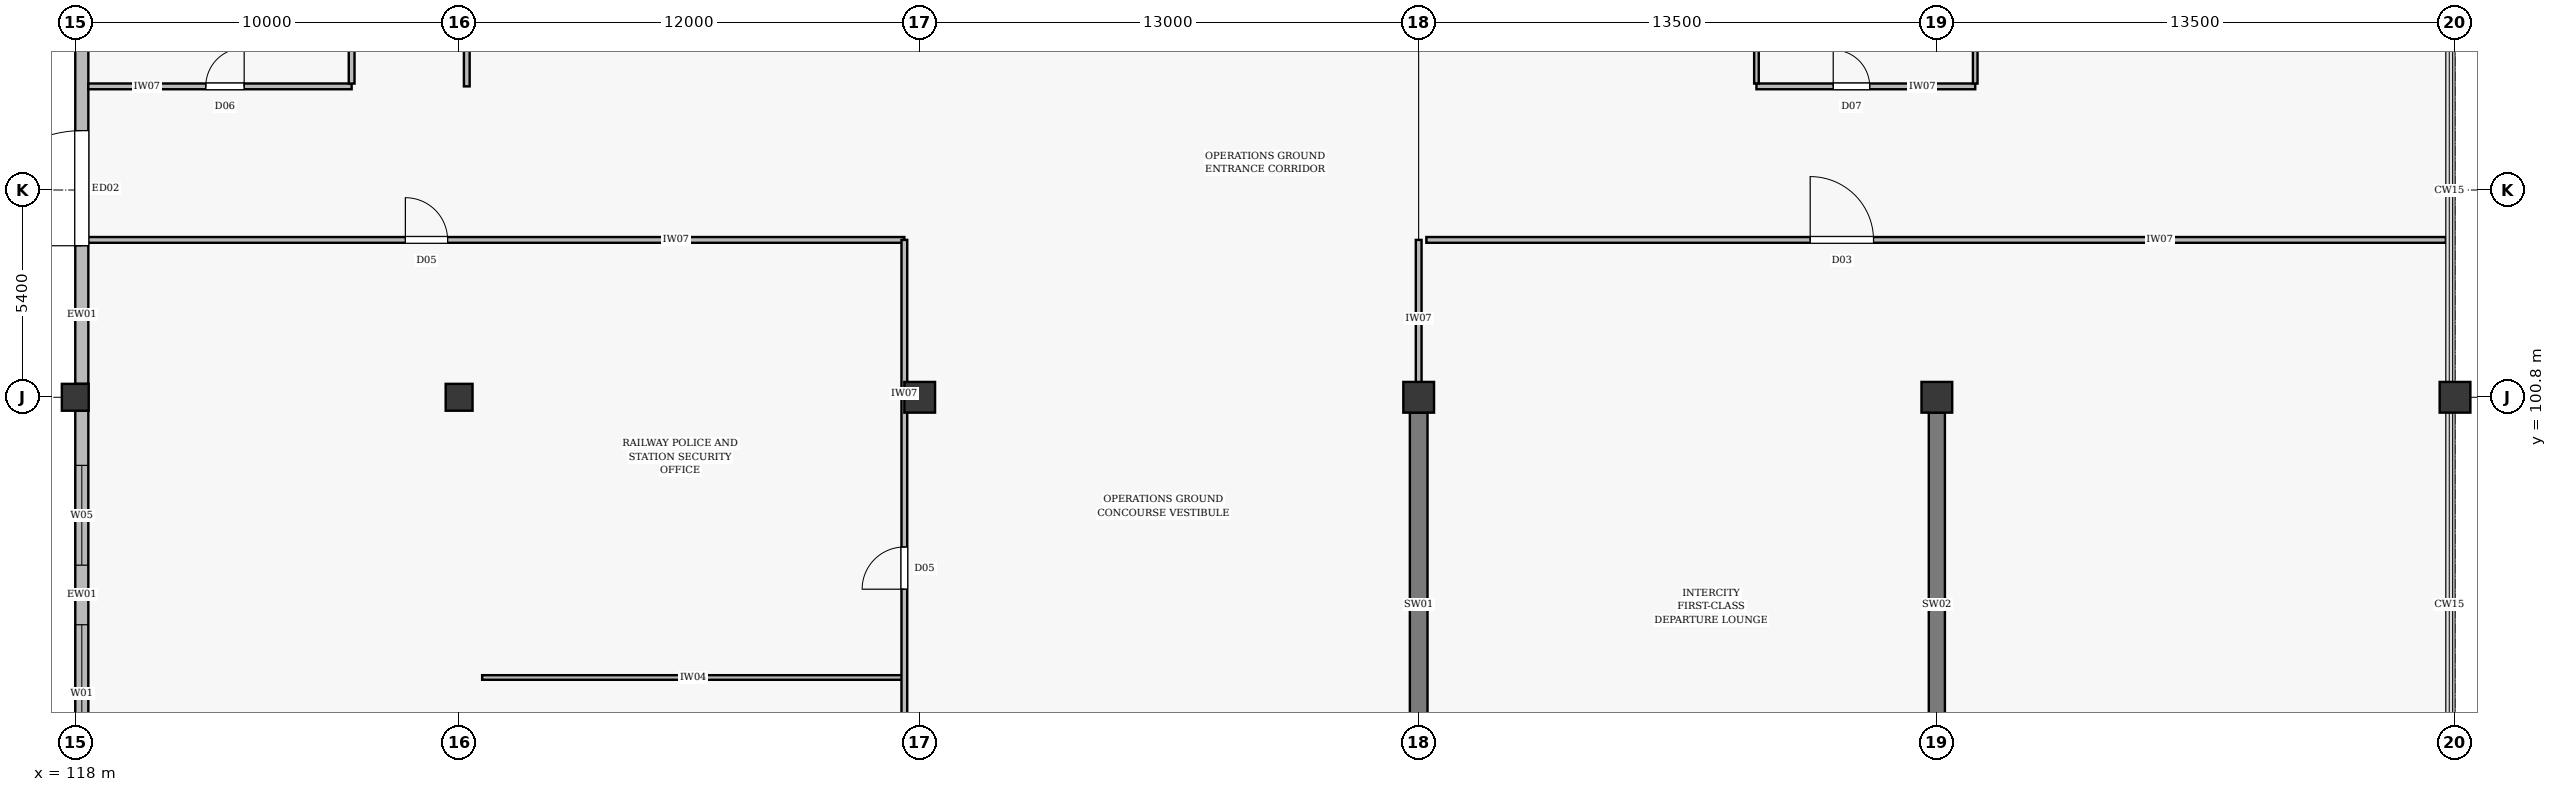
"""IFC4 building model, lengths in metres.
Left out: names, types, materials, properties, quantities, classifications, styles, units other than length and angle.
Written with IfcOpenShell. Run it as: python <this file> out.ifc"""

import sys

from ifc_helpers import new_model, si_unit, direction, frame, frame_2d, origin, origin_2d, place, context, subcontext, project, spatial, rectangle, extrude, element, fill, save


model = new_model("IFC4")
c1 = context("Model", 3, precision=1e-05, world=origin(), true_north=direction((0.0, 1.0)))
c2 = subcontext(c1, "Body", "Model", "MODEL_VIEW")
j1 = project(units=[si_unit("LENGTHUNIT", "METRE"), si_unit("PLANEANGLEUNIT", "RADIAN")], contexts=[c1])
p1 = place(None, origin())
s1 = spatial("IfcSite", under=j1, at=p1, CompositionType="ELEMENT")
p2 = place(p1, origin())
s2 = spatial("IfcBuilding", under=s1, at=p2, CompositionType="ELEMENT")
p3 = place(p2, origin())
s3 = spatial("IfcBuildingStorey", under=s2, at=p3, CompositionType="ELEMENT", Elevation=0.0)
for number, where, z_axis, x_axis in (
    (1, (118.0, 100.8, 0.0), (0.0, 0.0, 1.0), (1.0, 0.0, 0.0)),
    (2, (128.0, 100.8, 0.0), (0.0, 0.0, 1.0), (1.0, 0.0, 0.0)),
):
    element("IfcColumn", number, at=place(p3, frame(where, z_axis=z_axis, x_axis=x_axis)), inside=s3, PredefinedType="COLUMN", context=c2, shape_type="SweptSolid", body=[
        extrude(rectangle(XDim=0.7, YDim=0.7, at=origin_2d()), origin(), (0.0, 0.0, 1.0), 6.6),
    ])
for number, where, z_axis, x_axis in (
    (3, (140.0, 100.8, 0.0), (0.0, 0.0, 1.0), (1.0, 0.0, 0.0)),
    (4, (153.0, 100.8, 0.0), (0.0, 0.0, 1.0), (1.0, 0.0, 0.0)),
    (5, (166.5, 100.8, 0.0), (0.0, 0.0, 1.0), (1.0, 0.0, 0.0)),
    (6, (180.0, 100.8, 0.0), (0.0, 0.0, 1.0), (1.0, 0.0, 0.0)),
):
    element("IfcColumn", number, at=place(p3, frame(where, z_axis=z_axis, x_axis=x_axis)), inside=s3, PredefinedType="COLUMN", context=c2, shape_type="SweptSolid", body=[
        extrude(rectangle(XDim=0.8, YDim=0.8, at=origin_2d()), origin(), (0.0, 0.0, 1.0), 6.6),
    ])
p4 = place(p3, frame((153.0, 90.398, 0.0), z_axis=(0.0, 0.0, 1.0), x_axis=(0.0, 1.0, 0.0)))
e7 = element("IfcWall", 7, at=p4, inside=s3, PredefinedType="SHEAR", context=c2, shape_type="SweptSolid", body=[
    extrude(rectangle(XDim=10.004, YDim=0.46, at=frame_2d((5.002, 0.0))), origin(), (0.0, 0.0, 1.0), 6.35),
])
p5 = place(p3, frame((166.5, 90.398, 0.0), z_axis=(0.0, 0.0, 1.0), x_axis=(0.0, 1.0, 0.0)))
e8 = element("IfcWall", 8, at=p5, inside=s3, PredefinedType="SHEAR", context=c2, shape_type="SweptSolid", body=[
    extrude(rectangle(XDim=10.004, YDim=0.42, at=frame_2d((5.002, 0.0))), origin(), (0.0, 0.0, 1.0), 6.35),
])
p6 = place(p3, frame((118.17, 90.348, 0.0), z_axis=(0.0, 0.0, 1.0), x_axis=(0.0, 1.0, 0.0)))
e9 = element("IfcWall", 9, at=p6, inside=s3, PredefinedType="STANDARD", context=c2, shape_type="SweptSolid", body=[
    extrude(rectangle(XDim=10.104, YDim=0.34, at=frame_2d((5.052, 0.0))), origin(), (0.0, 0.0, 1.0), 5.75),
])
p7 = place(p6, frame((0.926, 0.0, 0.75)))
e10 = element("IfcOpeningElement", 10, at=p7, cuts=e9, PredefinedType="OPENING", context=c2, shape_type="SweptSolid", body=[
    extrude(rectangle(XDim=3.6, YDim=2.8, at=frame_2d((1.8, 1.4))), frame((0.0, 0.182, 0.0), z_axis=(0.0, -1.0, 0.0), x_axis=(1.0, 0.0, 0.0)), (0.0, 0.0, 1.0), 0.364),
])
p8 = place(p6, frame((6.078, 0.0, 0.75)))
e11 = element("IfcOpeningElement", 11, at=p8, cuts=e9, PredefinedType="OPENING", context=c2, shape_type="SweptSolid", body=[
    extrude(rectangle(XDim=2.6, YDim=2.4, at=frame_2d((1.3, 1.2))), frame((0.0, 0.182, 0.0), z_axis=(0.0, -1.0, 0.0), x_axis=(1.0, 0.0, 0.0)), (0.0, 0.0, 1.0), 0.364),
])
p9 = place(p3, frame((118.17, 101.148, 0.0), z_axis=(0.0, 0.0, 1.0), x_axis=(0.0, 1.0, 0.0)))
e12 = element("IfcWall", 12, at=p9, inside=s3, PredefinedType="STANDARD", context=c2, shape_type="SweptSolid", body=[
    extrude(rectangle(XDim=10.104, YDim=0.34, at=frame_2d((5.052, 0.0))), origin(), (0.0, 0.0, 1.0), 5.75),
])
p10 = place(p9, frame((3.6, 0.0, 0.005)))
e13 = element("IfcOpeningElement", 13, at=p10, cuts=e12, PredefinedType="OPENING", context=c2, shape_type="SweptSolid", body=[
    extrude(rectangle(XDim=3.0, YDim=2.8, at=frame_2d((1.5, 1.4))), frame((0.0, 0.182, 0.0), z_axis=(0.0, -1.0, 0.0), x_axis=(1.0, 0.0, 0.0)), (0.0, 0.0, 1.0), 0.364),
])
p11 = place(p3, frame((118.338, 104.9, 0.0), z_axis=(0.0, 0.0, 1.0), x_axis=(1.0, 0.0, 0.0)))
e14 = element("IfcWall", 14, at=p11, inside=s3, PredefinedType="PARTITIONING", context=c2, shape_type="SweptSolid", body=[
    extrude(rectangle(XDim=21.262, YDim=0.15, at=frame_2d((10.631, 0.0))), origin(), (0.0, 0.0, 1.0), 5.89),
])
p12 = place(p11, frame((8.262, 0.0, 0.005)))
e15 = element("IfcOpeningElement", 15, at=p12, cuts=e14, PredefinedType="OPENING", context=c2, shape_type="SweptSolid", body=[
    extrude(rectangle(XDim=1.1, YDim=2.1, at=frame_2d((0.55, 1.05))), frame((0.0, 0.087, 0.0), z_axis=(0.0, -1.0, 0.0), x_axis=(1.0, 0.0, 0.0)), (0.0, 0.0, 1.0), 0.174),
])
p13 = place(p3, frame((153.2, 104.9, 0.0), z_axis=(0.0, 0.0, 1.0), x_axis=(1.0, 0.0, 0.0)))
e16 = element("IfcWall", 16, at=p13, inside=s3, PredefinedType="PARTITIONING", context=c2, shape_type="SweptSolid", body=[
    extrude(rectangle(XDim=26.562, YDim=0.15, at=frame_2d((13.281, 0.0))), origin(), (0.0, 0.0, 1.0), 5.89),
])
p14 = place(p13, frame((10.0, 0.0, 0.005)))
e17 = element("IfcOpeningElement", 17, at=p14, cuts=e16, PredefinedType="OPENING", context=c2, shape_type="SweptSolid", body=[
    extrude(rectangle(XDim=1.65, YDim=2.2, at=frame_2d((0.825, 1.1))), frame((0.0, 0.087, 0.0), z_axis=(0.0, -1.0, 0.0), x_axis=(1.0, 0.0, 0.0)), (0.0, 0.0, 1.0), 0.174),
])
p15 = place(p3, frame((118.338, 108.9, 0.0), z_axis=(0.0, 0.0, 1.0), x_axis=(1.0, 0.0, 0.0)))
e18 = element("IfcWall", 18, at=p15, inside=s3, PredefinedType="PARTITIONING", context=c2, shape_type="SweptSolid", body=[
    extrude(rectangle(XDim=6.862, YDim=0.15, at=frame_2d((3.431, 0.0))), origin(), (0.0, 0.0, 1.0), 5.89),
])
p16 = place(p15, frame((3.062, 0.0, 0.005)))
e19 = element("IfcOpeningElement", 19, at=p16, cuts=e18, PredefinedType="OPENING", context=c2, shape_type="SweptSolid", body=[
    extrude(rectangle(XDim=1.0, YDim=2.1, at=frame_2d((0.5, 1.05))), frame((0.0, 0.087, 0.0), z_axis=(0.0, -1.0, 0.0), x_axis=(1.0, 0.0, 0.0)), (0.0, 0.0, 1.0), 0.174),
])
p17 = place(p3, frame((125.2, 108.973, 0.0), z_axis=(0.0, 0.0, 1.0), x_axis=(0.0, 1.0, 0.0)))
e20 = element("IfcWall", 20, at=p17, inside=s3, PredefinedType="PARTITIONING", context=c2, shape_type="SweptSolid", body=[
    extrude(rectangle(XDim=6.134, YDim=0.15, at=frame_2d((3.067, 0.0))), origin(), (0.0, 0.0, 1.0), 5.84),
])
p18 = place(p3, frame((161.8, 108.9, 0.0), z_axis=(0.0, 0.0, 1.0), x_axis=(1.0, 0.0, 0.0)))
e21 = element("IfcWall", 21, at=p18, inside=s3, PredefinedType="PARTITIONING", context=c2, shape_type="SweptSolid", body=[
    extrude(rectangle(XDim=5.7, YDim=0.15, at=frame_2d((2.85, 0.0))), origin(), (0.0, 0.0, 1.0), 5.89),
])
p19 = place(p18, frame((2.0, 0.0, 0.005)))
e22 = element("IfcOpeningElement", 22, at=p19, cuts=e21, PredefinedType="OPENING", context=c2, shape_type="SweptSolid", body=[
    extrude(rectangle(XDim=0.95, YDim=2.1, at=frame_2d((0.475, 1.05))), frame((0.0, 0.087, 0.0), z_axis=(0.0, -1.0, 0.0), x_axis=(1.0, 0.0, 0.0)), (0.0, 0.0, 1.0), 0.174),
])
p20 = place(p3, frame((167.5, 108.973, 0.0), z_axis=(0.0, 0.0, 1.0), x_axis=(0.0, 1.0, 0.0)))
e23 = element("IfcWall", 23, at=p20, inside=s3, PredefinedType="PARTITIONING", context=c2, shape_type="SweptSolid", body=[
    extrude(rectangle(XDim=6.427, YDim=0.12, at=frame_2d((3.213, 0.0))), origin(), (0.0, 0.0, 1.0), 5.74),
])
p21 = place(p20, frame((5.177, 0.0, 0.005)))
e24 = element("IfcOpeningElement", 24, at=p21, cuts=e23, PredefinedType="OPENING", context=c2, shape_type="SweptSolid", body=[
    extrude(rectangle(XDim=0.9, YDim=2.1, at=frame_2d((0.45, 1.05))), frame((0.0, 0.072, 0.0), z_axis=(0.0, -1.0, 0.0), x_axis=(1.0, 0.0, 0.0)), (0.0, 0.0, 1.0), 0.144),
])
p22 = place(p3, frame((161.8, 108.973, 0.0), z_axis=(0.0, 0.0, 1.0), x_axis=(0.0, 1.0, 0.0)))
e25 = element("IfcWall", 25, at=p22, inside=s3, PredefinedType="PARTITIONING", context=c2, shape_type="SweptSolid", body=[
    extrude(rectangle(XDim=13.189, YDim=0.12, at=frame_2d((6.595, 0.0))), origin(), (0.0, 0.0, 1.0), 5.74),
])
p23 = place(p3, frame((128.2, 108.9, 0.0), z_axis=(0.0, 0.0, 1.0), x_axis=(0.0, 1.0, 0.0)))
e26 = element("IfcWall", 26, at=p23, inside=s3, PredefinedType="PARTITIONING", context=c2, shape_type="SweptSolid", body=[
    extrude(rectangle(XDim=3.3, YDim=0.15, at=frame_2d((1.65, 0.0))), origin(), (0.0, 0.0, 1.0), 5.84),
])
p24 = place(p3, frame((128.6, 93.5, 0.0), z_axis=(0.0, 0.0, 1.0), x_axis=(1.0, 0.0, 0.0)))
e27 = element("IfcWall", 27, at=p24, inside=s3, PredefinedType="PARTITIONING", context=c2, shape_type="SweptSolid", body=[
    extrude(rectangle(XDim=11.0, YDim=0.12, at=frame_2d((5.5, 0.0))), origin(), (0.0, 0.0, 1.0), 5.89),
])
p25 = place(p3, frame((139.6, 90.3, 0.0), z_axis=(0.0, 0.0, 1.0), x_axis=(0.0, 1.0, 0.0)))
e28 = element("IfcWall", 28, at=p25, inside=s3, PredefinedType="PARTITIONING", context=c2, shape_type="SweptSolid", body=[
    extrude(rectangle(XDim=14.6, YDim=0.15, at=frame_2d((7.3, 0.0))), origin(), (0.0, 0.0, 1.0), 5.74),
])
p26 = place(p25, frame((5.5, 0.0, 0.005)))
e29 = element("IfcOpeningElement", 29, at=p26, cuts=e28, PredefinedType="OPENING", context=c2, shape_type="SweptSolid", body=[
    extrude(rectangle(XDim=1.1, YDim=2.1, at=frame_2d((0.55, 1.05))), frame((0.0, 0.087, 0.0), z_axis=(0.0, -1.0, 0.0), x_axis=(1.0, 0.0, 0.0)), (0.0, 0.0, 1.0), 0.174),
])
p27 = place(p3, frame((153.0, 100.8, 0.0), z_axis=(0.0, 0.0, 1.0), x_axis=(0.0, 1.0, 0.0)))
e30 = element("IfcWall", 30, at=p27, inside=s3, PredefinedType="PARTITIONING", context=c2, shape_type="SweptSolid", body=[
    extrude(rectangle(XDim=4.1, YDim=0.15, at=frame_2d((2.05, 0.0))), origin(), (0.0, 0.0, 1.0), 5.74),
])
p28 = place(p7, origin())
e31 = element("IfcWindow", 31, at=p28, inside=s3, PartitioningType="DOUBLE_PANEL_VERTICAL", PredefinedType="WINDOW", context=c2, shape_type="SweptSolid", body=[
    extrude(rectangle(XDim=3.6, YDim=2.8, at=frame_2d((1.8, 1.4))), frame((0.0, 0.03, 0.0), z_axis=(0.0, -1.0, 0.0), x_axis=(1.0, 0.0, 0.0)), (0.0, 0.0, 1.0), 0.06),
])
fill(e10, e31)
p29 = place(p8, origin())
e32 = element("IfcWindow", 32, at=p29, inside=s3, PartitioningType="DOUBLE_PANEL_VERTICAL", PredefinedType="WINDOW", context=c2, shape_type="SweptSolid", body=[
    extrude(rectangle(XDim=2.6, YDim=2.4, at=frame_2d((1.3, 1.2))), frame((0.0, 0.03, 0.0), z_axis=(0.0, -1.0, 0.0), x_axis=(1.0, 0.0, 0.0)), (0.0, 0.0, 1.0), 0.06),
])
fill(e11, e32)
p30 = place(p10, origin())
e33 = element("IfcDoor", 33, at=p30, inside=s3, OperationType="DOUBLE_DOOR_SINGLE_SWING", PredefinedType="DOOR", context=c2, shape_type="SweptSolid", body=[
    extrude(rectangle(XDim=3.0, YDim=2.8, at=frame_2d((1.5, 1.4))), frame((0.0, 0.025, 0.0), z_axis=(0.0, -1.0, 0.0), x_axis=(1.0, 0.0, 0.0)), (0.0, 0.0, 1.0), 0.05),
])
fill(e13, e33)
p31 = place(p12, origin())
e34 = element("IfcDoor", 34, at=p31, inside=s3, OperationType="SINGLE_SWING_LEFT", PredefinedType="DOOR", context=c2, shape_type="SweptSolid", body=[
    extrude(rectangle(XDim=1.1, YDim=2.1, at=frame_2d((0.55, 1.05))), frame((0.0, 0.025, 0.0), z_axis=(0.0, -1.0, 0.0), x_axis=(1.0, 0.0, 0.0)), (0.0, 0.0, 1.0), 0.05),
])
fill(e15, e34)
p32 = place(p14, origin())
e35 = element("IfcDoor", 35, at=p32, inside=s3, OperationType="DOUBLE_DOOR_SINGLE_SWING", PredefinedType="DOOR", context=c2, shape_type="SweptSolid", body=[
    extrude(rectangle(XDim=1.65, YDim=2.2, at=frame_2d((0.825, 1.1))), frame((0.0, 0.025, 0.0), z_axis=(0.0, -1.0, 0.0), x_axis=(1.0, 0.0, 0.0)), (0.0, 0.0, 1.0), 0.05),
])
fill(e17, e35)
p33 = place(p16, origin())
e36 = element("IfcDoor", 36, at=p33, inside=s3, OperationType="SINGLE_SWING_RIGHT", PredefinedType="DOOR", context=c2, shape_type="SweptSolid", body=[
    extrude(rectangle(XDim=1.0, YDim=2.1, at=frame_2d((0.5, 1.05))), frame((0.0, 0.025, 0.0), z_axis=(0.0, -1.0, 0.0), x_axis=(1.0, 0.0, 0.0)), (0.0, 0.0, 1.0), 0.05),
])
fill(e19, e36)
p34 = place(p19, origin())
e37 = element("IfcDoor", 37, at=p34, inside=s3, OperationType="SINGLE_SWING_LEFT", PredefinedType="DOOR", context=c2, shape_type="SweptSolid", body=[
    extrude(rectangle(XDim=0.95, YDim=2.1, at=frame_2d((0.475, 1.05))), frame((0.0, 0.025, 0.0), z_axis=(0.0, -1.0, 0.0), x_axis=(1.0, 0.0, 0.0)), (0.0, 0.0, 1.0), 0.05),
])
fill(e22, e37)
p35 = place(p26, origin())
e38 = element("IfcDoor", 38, at=p35, inside=s3, OperationType="SINGLE_SWING_LEFT", PredefinedType="DOOR", context=c2, shape_type="SweptSolid", body=[
    extrude(rectangle(XDim=1.1, YDim=2.1, at=frame_2d((0.55, 1.05))), frame((0.0, 0.025, 0.0), z_axis=(0.0, -1.0, 0.0), x_axis=(1.0, 0.0, 0.0)), (0.0, 0.0, 1.0), 0.05),
])
fill(e29, e38)
save(model, sys.argv[1])
